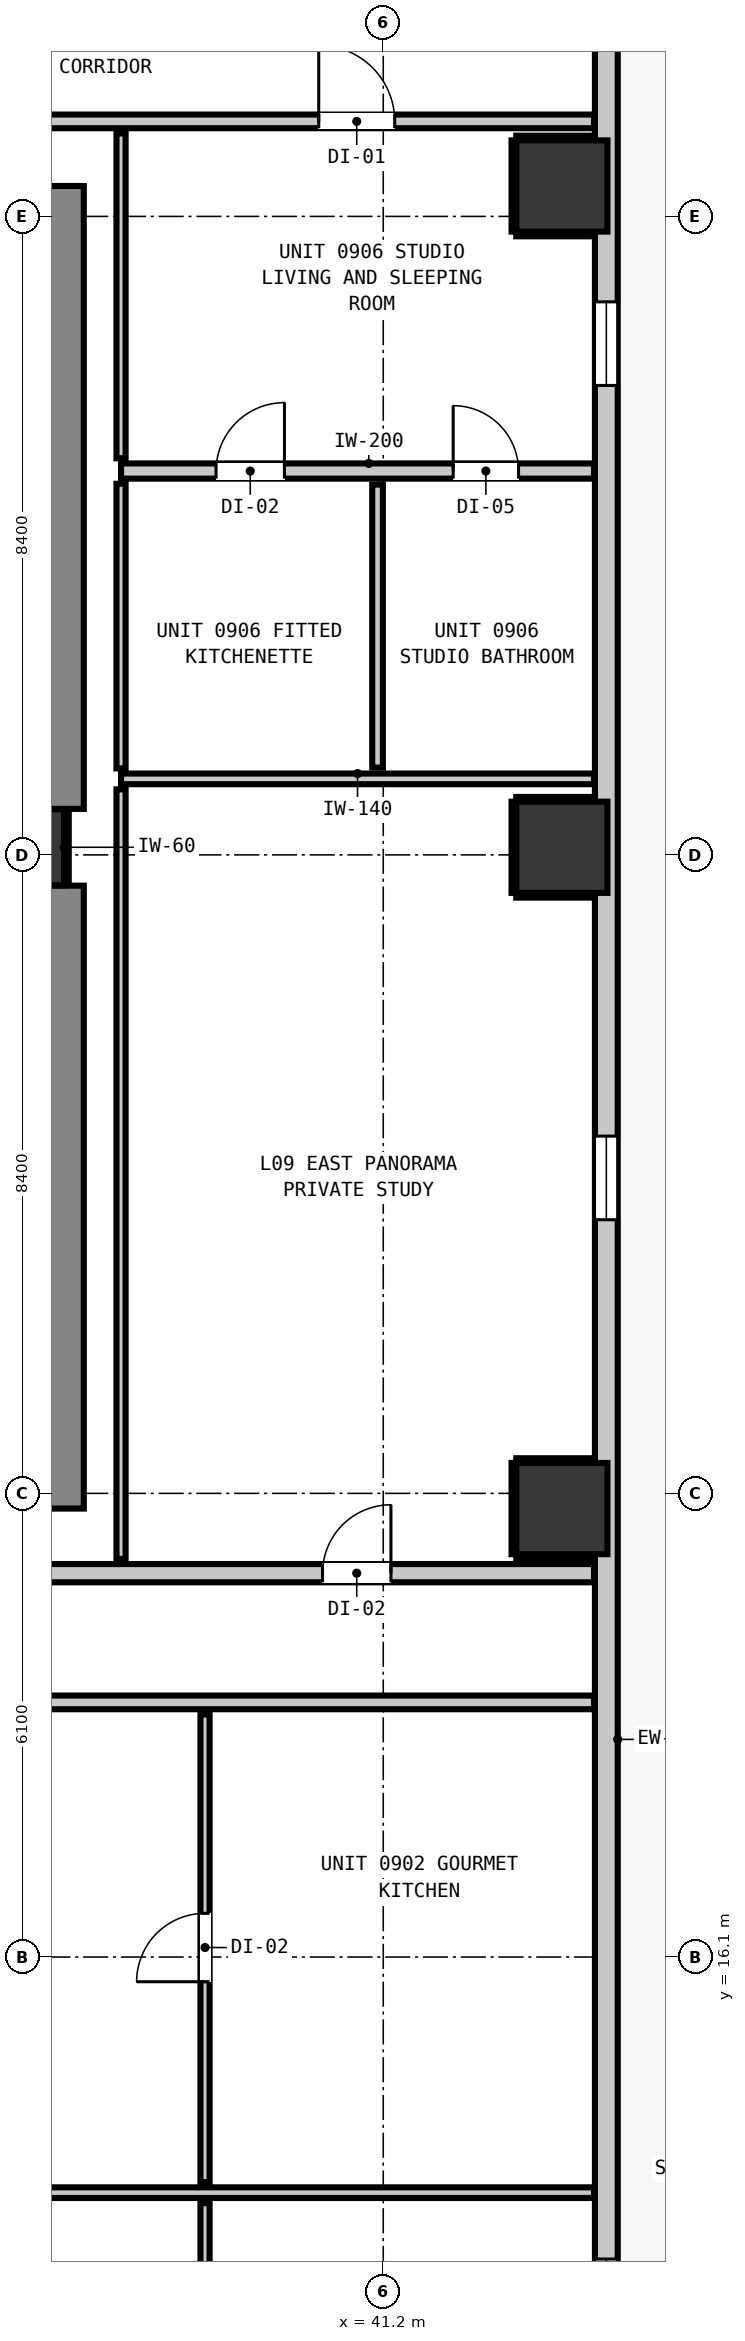
"""IFC4 building model, lengths in metres.
Left out: names, types, materials, properties, quantities, classifications, styles, units other than length and angle.
Written with IfcOpenShell. Run it as: python <this file> out.ifc"""

import sys

from ifc_helpers import new_model, si_unit, direction, frame, frame_2d, origin, origin_2d, place, context, subcontext, project, spatial, rectangle, extrude, element, fill, save


model = new_model("IFC4")
c1 = context("Model", 3, precision=1e-05, world=origin(), true_north=direction((0.0, 1.0)))
c2 = subcontext(c1, "Body", "Model", "MODEL_VIEW")
j1 = project(units=[si_unit("LENGTHUNIT", "METRE"), si_unit("PLANEANGLEUNIT", "RADIAN")], contexts=[c1])
p1 = place(None, origin())
s1 = spatial("IfcSite", under=j1, at=p1, CompositionType="ELEMENT")
p2 = place(p1, origin())
s2 = spatial("IfcBuilding", under=s1, at=p2, CompositionType="ELEMENT")
p3 = place(p2, frame((0.0, 0.0, 35.28)))
s3 = spatial("IfcBuildingStorey", under=s2, at=p3, CompositionType="ELEMENT", Elevation=35.28)
p4 = place(p3, frame((36.5, 30.7, 0.0), z_axis=(0.0, 0.0, 1.0), x_axis=(1.0, 0.0, 0.0)))
e1 = element("IfcColumn", 1, at=p4, inside=s3, PredefinedType="COLUMN", context=c2, shape_type="SweptSolid", body=[
    extrude(rectangle(XDim=1.0, YDim=1.0, at=origin_2d()), origin(), (0.0, 0.0, 1.0), 3.32),
])
p5 = place(p3, frame((36.66, 22.0, 0.0), z_axis=(0.0, 0.0, 1.0), x_axis=(0.0, 1.0, 0.0)))
e2 = element("IfcWall", 2, at=p5, inside=s3, PredefinedType="SHEAR", context=c2, shape_type="SweptSolid", body=[
    extrude(rectangle(XDim=8.195, YDim=1.2, at=frame_2d((4.098, 0.0))), origin(), (0.0, 0.0, 1.0), 3.32),
])
p6 = place(p3, frame((36.66, 31.205, 0.0), z_axis=(0.0, 0.0, 1.0), x_axis=(0.0, 1.0, 0.0)))
e3 = element("IfcWall", 3, at=p6, inside=s3, PredefinedType="SHEAR", context=c2, shape_type="SweptSolid", body=[
    extrude(rectangle(XDim=8.195, YDim=1.2, at=frame_2d((4.097, 0.0))), origin(), (0.0, 0.0, 1.0), 3.32),
])
for number, where, z_axis, x_axis in (
    (4, (43.55, 22.0, 0.0), (0.0, 0.0, 1.0), (1.0, 0.0, 0.0)),
    (5, (43.55, 30.7, 0.0), (0.0, 0.0, 1.0), (1.0, 0.0, 0.0)),
    (6, (43.55, 39.4, 0.0), (0.0, 0.0, 1.0), (1.0, 0.0, 0.0)),
):
    element("IfcColumn", number, at=place(p3, frame(where, z_axis=z_axis, x_axis=x_axis)), inside=s3, PredefinedType="COLUMN", context=c2, shape_type="SweptSolid", body=[
        extrude(rectangle(XDim=1.2, YDim=1.2, at=origin_2d()), origin(), (0.0, 0.0, 1.0), 3.32),
    ])
p7 = place(p3, frame((44.135, 44.835, 0.0), z_axis=(0.0, 0.0, 1.0), x_axis=(0.0, -1.0, 0.0)))
e7 = element("IfcWall", 7, at=p7, inside=s3, PredefinedType="STANDARD", context=c2, shape_type="SweptSolid", body=[
    extrude(rectangle(XDim=34.67, YDim=0.3, at=frame_2d((17.335, 0.0))), origin(), (0.0, 0.0, 1.0), 3.06),
])
p8 = place(p7, frame((1.251, 0.0, 0.0)))
e8 = element("IfcOpeningElement", 8, at=p8, cuts=e7, PredefinedType="OPENING", context=c2, shape_type="SweptSolid", body=[
    extrude(rectangle(XDim=1.0, YDim=2.15, at=frame_2d((0.5, 1.075))), frame((0.0, 0.16, 0.0), z_axis=(0.0, -1.0, 0.0), x_axis=(1.0, 0.0, 0.0)), (0.0, 0.0, 1.0), 0.32),
])
p9 = place(p7, frame((32.708, 0.0, 0.85)))
e9 = element("IfcOpeningElement", 9, at=p9, cuts=e7, PredefinedType="OPENING", context=c2, shape_type="SweptSolid", body=[
    extrude(rectangle(XDim=1.1, YDim=2.05, at=frame_2d((0.55, 1.025))), frame((0.0, 0.16, 0.0), z_axis=(0.0, -1.0, 0.0), x_axis=(1.0, 0.0, 0.0)), (0.0, 0.0, 1.0), 0.32),
])
p10 = place(p7, frame((17.935, 0.0, 0.85)))
e10 = element("IfcOpeningElement", 10, at=p10, cuts=e7, PredefinedType="OPENING", context=c2, shape_type="SweptSolid", body=[
    extrude(rectangle(XDim=1.1, YDim=2.05, at=frame_2d((0.55, 1.025))), frame((0.0, 0.16, 0.0), z_axis=(0.0, -1.0, 0.0), x_axis=(1.0, 0.0, 0.0)), (0.0, 0.0, 1.0), 0.32),
])
p11 = place(p7, frame((6.959, 0.0, 0.85)))
e11 = element("IfcOpeningElement", 11, at=p11, cuts=e7, PredefinedType="OPENING", context=c2, shape_type="SweptSolid", body=[
    extrude(rectangle(XDim=1.1, YDim=2.05, at=frame_2d((0.55, 1.025))), frame((0.0, 0.16, 0.0), z_axis=(0.0, -1.0, 0.0), x_axis=(1.0, 0.0, 0.0)), (0.0, 0.0, 1.0), 0.32),
])
p12 = place(p3, frame((1.827, 21.15, 0.0), z_axis=(0.0, 0.0, 1.0), x_axis=(1.0, 0.0, 0.0)))
e12 = element("IfcWall", 12, at=p12, inside=s3, PredefinedType="PARTITIONING", context=c2, shape_type="SweptSolid", body=[
    extrude(rectangle(XDim=42.146, YDim=0.24, at=frame_2d((21.073, 0.0))), origin(), (0.0, 0.0, 1.0), 3.06),
])
p13 = place(p12, frame((16.383, 0.0, 0.0)))
e13 = element("IfcOpeningElement", 13, at=p13, cuts=e12, PredefinedType="OPENING", context=c2, shape_type="SweptSolid", body=[
    extrude(rectangle(XDim=1.1, YDim=2.15, at=frame_2d((0.55, 1.075))), frame((0.0, 0.13, 0.0), z_axis=(0.0, -1.0, 0.0), x_axis=(1.0, 0.0, 0.0)), (0.0, 0.0, 1.0), 0.26),
])
p14 = place(p12, frame((8.647, 0.0, 0.0)))
e14 = element("IfcOpeningElement", 14, at=p14, cuts=e12, PredefinedType="OPENING", context=c2, shape_type="SweptSolid", body=[
    extrude(rectangle(XDim=1.4, YDim=2.15, at=frame_2d((0.7, 1.075))), frame((0.0, 0.13, 0.0), z_axis=(0.0, -1.0, 0.0), x_axis=(1.0, 0.0, 0.0)), (0.0, 0.0, 1.0), 0.26),
])
p15 = place(p12, frame((38.574, 0.0, 0.0)))
e15 = element("IfcOpeningElement", 15, at=p15, cuts=e12, PredefinedType="OPENING", context=c2, shape_type="SweptSolid", body=[
    extrude(rectangle(XDim=0.9, YDim=2.1, at=frame_2d((0.45, 1.05))), frame((0.0, 0.13, 0.0), z_axis=(0.0, -1.0, 0.0), x_axis=(1.0, 0.0, 0.0)), (0.0, 0.0, 1.0), 0.26),
])
p16 = place(p3, frame((37.75, 35.65, 0.0), z_axis=(0.0, 0.0, 1.0), x_axis=(1.0, 0.0, 0.0)))
e16 = element("IfcWall", 16, at=p16, inside=s3, PredefinedType="PARTITIONING", context=c2, shape_type="SweptSolid", body=[
    extrude(rectangle(XDim=6.223, YDim=0.2, at=frame_2d((3.111, 0.0))), origin(), (0.0, 0.0, 1.0), 3.06),
])
p17 = place(p16, frame((1.25, 0.0, 0.0)))
e17 = element("IfcOpeningElement", 17, at=p17, cuts=e16, PredefinedType="OPENING", context=c2, shape_type="SweptSolid", body=[
    extrude(rectangle(XDim=0.9, YDim=2.1, at=frame_2d((0.45, 1.05))), frame((0.0, 0.11, 0.0), z_axis=(0.0, -1.0, 0.0), x_axis=(1.0, 0.0, 0.0)), (0.0, 0.0, 1.0), 0.22),
])
p18 = place(p16, frame((4.37, 0.0, 0.0)))
e18 = element("IfcOpeningElement", 18, at=p18, cuts=e16, PredefinedType="OPENING", context=c2, shape_type="SweptSolid", body=[
    extrude(rectangle(XDim=0.86, YDim=2.02, at=frame_2d((0.43, 1.01))), frame((0.0, 0.11, 0.0), z_axis=(0.0, -1.0, 0.0), x_axis=(1.0, 0.0, 0.0)), (0.0, 0.0, 1.0), 0.22),
])
p19 = place(p3, frame((1.827, 19.45, 0.0), z_axis=(0.0, 0.0, 1.0), x_axis=(1.0, 0.0, 0.0)))
e19 = element("IfcWall", 19, at=p19, inside=s3, PredefinedType="PARTITIONING", context=c2, shape_type="SweptSolid", body=[
    extrude(rectangle(XDim=42.146, YDim=0.18, at=frame_2d((21.073, 0.0))), origin(), (0.0, 0.0, 1.0), 3.06),
])
p20 = place(p19, frame((8.602, 0.0, 0.0)))
e20 = element("IfcOpeningElement", 20, at=p20, cuts=e19, PredefinedType="OPENING", context=c2, shape_type="SweptSolid", body=[
    extrude(rectangle(XDim=1.0, YDim=2.15, at=frame_2d((0.5, 1.075))), frame((0.0, 0.1, 0.0), z_axis=(0.0, -1.0, 0.0), x_axis=(1.0, 0.0, 0.0)), (0.0, 0.0, 1.0), 0.2),
])
p21 = place(p19, frame((30.475, 0.0, 0.0)))
e21 = element("IfcOpeningElement", 21, at=p21, cuts=e19, PredefinedType="OPENING", context=c2, shape_type="SweptSolid", body=[
    extrude(rectangle(XDim=1.0, YDim=2.15, at=frame_2d((0.5, 1.075))), frame((0.0, 0.1, 0.0), z_axis=(0.0, -1.0, 0.0), x_axis=(1.0, 0.0, 0.0)), (0.0, 0.0, 1.0), 0.2),
])
p22 = place(p3, frame((12.989, 40.25, 0.0), z_axis=(0.0, 0.0, 1.0), x_axis=(1.0, 0.0, 0.0)))
e22 = element("IfcWall", 22, at=p22, inside=s3, PredefinedType="PARTITIONING", context=c2, shape_type="SweptSolid", body=[
    extrude(rectangle(XDim=30.984, YDim=0.18, at=frame_2d((15.492, 0.0))), origin(), (0.0, 0.0, 1.0), 3.06),
])
p23 = place(p22, frame((4.446, 0.0, 0.0)))
e23 = element("IfcOpeningElement", 23, at=p23, cuts=e22, PredefinedType="OPENING", context=c2, shape_type="SweptSolid", body=[
    extrude(rectangle(XDim=1.4, YDim=2.15, at=frame_2d((0.7, 1.075))), frame((0.0, 0.1, 0.0), z_axis=(0.0, -1.0, 0.0), x_axis=(1.0, 0.0, 0.0)), (0.0, 0.0, 1.0), 0.2),
])
p24 = place(p22, frame((27.362, 0.0, 0.0)))
e24 = element("IfcOpeningElement", 24, at=p24, cuts=e22, PredefinedType="OPENING", context=c2, shape_type="SweptSolid", body=[
    extrude(rectangle(XDim=1.0, YDim=2.15, at=frame_2d((0.5, 1.075))), frame((0.0, 0.1, 0.0), z_axis=(0.0, -1.0, 0.0), x_axis=(1.0, 0.0, 0.0)), (0.0, 0.0, 1.0), 0.2),
])
p25 = place(p3, frame((11.688, 13.0, 0.0), z_axis=(0.0, 0.0, 1.0), x_axis=(1.0, 0.0, 0.0)))
e25 = element("IfcWall", 25, at=p25, inside=s3, PredefinedType="PARTITIONING", context=c2, shape_type="SweptSolid", body=[
    extrude(rectangle(XDim=32.285, YDim=0.14, at=frame_2d((16.143, 0.0))), origin(), (0.0, 0.0, 1.0), 3.06),
])
p26 = place(p25, frame((20.664, 0.0, 0.0)))
e26 = element("IfcOpeningElement", 26, at=p26, cuts=e25, PredefinedType="OPENING", context=c2, shape_type="SweptSolid", body=[
    extrude(rectangle(XDim=0.9, YDim=2.1, at=frame_2d((0.45, 1.05))), frame((0.0, 0.08, 0.0), z_axis=(0.0, -1.0, 0.0), x_axis=(1.0, 0.0, 0.0)), (0.0, 0.0, 1.0), 0.16),
])
p27 = place(p3, frame((37.75, 31.6, 0.0), z_axis=(0.0, 0.0, 1.0), x_axis=(1.0, 0.0, 0.0)))
e27 = element("IfcWall", 27, at=p27, inside=s3, PredefinedType="PARTITIONING", context=c2, shape_type="SweptSolid", body=[
    extrude(rectangle(XDim=6.223, YDim=0.14, at=frame_2d((3.111, 0.0))), origin(), (0.0, 0.0, 1.0), 3.06),
])
p28 = place(p3, frame((41.125, 31.748, 0.0), z_axis=(0.0, 0.0, 1.0), x_axis=(0.0, 1.0, 0.0)))
e28 = element("IfcWall", 28, at=p28, inside=s3, PredefinedType="PARTITIONING", context=c2, shape_type="SweptSolid", body=[
    extrude(rectangle(XDim=3.724, YDim=0.14, at=frame_2d((1.862, 0.0))), origin(), (0.0, 0.0, 1.0), 3.06),
])
p29 = place(p3, frame((37.75, 21.338, 0.0), z_axis=(0.0, 0.0, 1.0), x_axis=(0.0, 1.0, 0.0)))
e29 = element("IfcWall", 29, at=p29, inside=s3, PredefinedType="PARTITIONING", context=c2, shape_type="SweptSolid", body=[
    extrude(rectangle(XDim=10.124, YDim=0.12, at=frame_2d((5.062, 0.0))), origin(), (0.0, 0.0, 1.0), 3.06),
])
p30 = place(p3, frame((37.75, 31.738, 0.0), z_axis=(0.0, 0.0, 1.0), x_axis=(0.0, 1.0, 0.0)))
e30 = element("IfcWall", 30, at=p30, inside=s3, PredefinedType="PARTITIONING", context=c2, shape_type="SweptSolid", body=[
    extrude(rectangle(XDim=3.744, YDim=0.12, at=frame_2d((1.872, 0.0))), origin(), (0.0, 0.0, 1.0), 3.06),
])
p31 = place(p3, frame((37.75, 35.818, 0.0), z_axis=(0.0, 0.0, 1.0), x_axis=(0.0, 1.0, 0.0)))
e31 = element("IfcWall", 31, at=p31, inside=s3, PredefinedType="PARTITIONING", context=c2, shape_type="SweptSolid", body=[
    extrude(rectangle(XDim=4.274, YDim=0.12, at=frame_2d((2.137, 0.0))), origin(), (0.0, 0.0, 1.0), 3.06),
])
p32 = place(p3, frame((38.855, 8.691, 0.0), z_axis=(0.0, 0.0, 1.0), x_axis=(0.0, 1.0, 0.0)))
e32 = element("IfcWall", 32, at=p32, inside=s3, PredefinedType="PARTITIONING", context=c2, shape_type="SweptSolid", body=[
    extrude(rectangle(XDim=4.171, YDim=0.12, at=frame_2d((2.085, 0.0))), origin(), (0.0, 0.0, 1.0), 2.445),
])
p33 = place(p32, frame((1.259, 0.0, 0.0)))
e33 = element("IfcOpeningElement", 33, at=p33, cuts=e32, PredefinedType="OPENING", context=c2, shape_type="SweptSolid", body=[
    extrude(rectangle(XDim=0.9, YDim=2.1, at=frame_2d((0.45, 1.05))), frame((0.0, 0.07, 0.0), z_axis=(0.0, -1.0, 0.0), x_axis=(1.0, 0.0, 0.0)), (0.0, 0.0, 1.0), 0.14),
])
p34 = place(p3, frame((38.855, 13.138, 0.0), z_axis=(0.0, 0.0, 1.0), x_axis=(0.0, 1.0, 0.0)))
e34 = element("IfcWall", 34, at=p34, inside=s3, PredefinedType="PARTITIONING", context=c2, shape_type="SweptSolid", body=[
    extrude(rectangle(XDim=6.154, YDim=0.12, at=frame_2d((3.077, 0.0))), origin(), (0.0, 0.0, 1.0), 2.445),
])
p35 = place(p34, frame((2.637, 0.0, 0.0)))
e35 = element("IfcOpeningElement", 35, at=p35, cuts=e34, PredefinedType="OPENING", context=c2, shape_type="SweptSolid", body=[
    extrude(rectangle(XDim=0.9, YDim=2.1, at=frame_2d((0.45, 1.05))), frame((0.0, 0.07, 0.0), z_axis=(0.0, -1.0, 0.0), x_axis=(1.0, 0.0, 0.0)), (0.0, 0.0, 1.0), 0.14),
])
p36 = place(p3, frame((37.032, 30.21, 0.0), z_axis=(0.0, 0.0, 1.0), x_axis=(0.0, 1.0, 0.0)))
e36 = element("IfcWall", 36, at=p36, inside=s3, PredefinedType="PARTITIONING", context=c2, shape_type="SweptSolid", body=[
    extrude(rectangle(XDim=0.98, YDim=0.06, at=frame_2d((0.49, 0.0))), origin(), (0.0, 0.0, 1.0), 1.45),
])
for number, where, z_axis, x_axis in (
    (37, (42.95, 21.368, 0.0), (0.0, 0.0, 1.0), (1.0, 0.0, 0.0)),
    (38, (42.95, 22.632, 0.0), (0.0, 0.0, 1.0), (1.0, 0.0, 0.0)),
):
    element("IfcWall", number, at=place(p3, frame(where, z_axis=z_axis, x_axis=x_axis)), inside=s3, PredefinedType="PARTITIONING", context=c2, shape_type="SweptSolid", body=[
        extrude(rectangle(XDim=1.02, YDim=0.06, at=frame_2d((0.51, 0.0))), origin(), (0.0, 0.0, 1.0), 1.45),
    ])
p37 = place(p3, frame((42.918, 21.4, 0.0), z_axis=(0.0, 0.0, 1.0), x_axis=(0.0, 1.0, 0.0)))
e39 = element("IfcWall", 39, at=p37, inside=s3, PredefinedType="PARTITIONING", context=c2, shape_type="SweptSolid", body=[
    extrude(rectangle(XDim=1.2, YDim=0.06, at=frame_2d((0.6, 0.0))), origin(), (0.0, 0.0, 1.0), 1.45),
])
for number, where, z_axis, x_axis in (
    (40, (42.95, 30.068, 0.0), (0.0, 0.0, 1.0), (1.0, 0.0, 0.0)),
    (41, (42.95, 31.332, 0.0), (0.0, 0.0, 1.0), (1.0, 0.0, 0.0)),
):
    element("IfcWall", number, at=place(p3, frame(where, z_axis=z_axis, x_axis=x_axis)), inside=s3, PredefinedType="PARTITIONING", context=c2, shape_type="SweptSolid", body=[
        extrude(rectangle(XDim=1.02, YDim=0.06, at=frame_2d((0.51, 0.0))), origin(), (0.0, 0.0, 1.0), 1.45),
    ])
p38 = place(p3, frame((42.918, 30.1, 0.0), z_axis=(0.0, 0.0, 1.0), x_axis=(0.0, 1.0, 0.0)))
e42 = element("IfcWall", 42, at=p38, inside=s3, PredefinedType="PARTITIONING", context=c2, shape_type="SweptSolid", body=[
    extrude(rectangle(XDim=1.2, YDim=0.06, at=frame_2d((0.6, 0.0))), origin(), (0.0, 0.0, 1.0), 1.45),
])
for number, where, z_axis, x_axis in (
    (43, (42.95, 38.768, 0.0), (0.0, 0.0, 1.0), (1.0, 0.0, 0.0)),
    (44, (42.95, 40.032, 0.0), (0.0, 0.0, 1.0), (1.0, 0.0, 0.0)),
):
    element("IfcWall", number, at=place(p3, frame(where, z_axis=z_axis, x_axis=x_axis)), inside=s3, PredefinedType="PARTITIONING", context=c2, shape_type="SweptSolid", body=[
        extrude(rectangle(XDim=1.02, YDim=0.06, at=frame_2d((0.51, 0.0))), origin(), (0.0, 0.0, 1.0), 1.45),
    ])
p39 = place(p3, frame((42.918, 38.8, 0.0), z_axis=(0.0, 0.0, 1.0), x_axis=(0.0, 1.0, 0.0)))
e45 = element("IfcWall", 45, at=p39, inside=s3, PredefinedType="PARTITIONING", context=c2, shape_type="SweptSolid", body=[
    extrude(rectangle(XDim=1.2, YDim=0.06, at=frame_2d((0.6, 0.0))), origin(), (0.0, 0.0, 1.0), 1.45),
])
p40 = place(p9, origin())
e46 = element("IfcWindow", 46, at=p40, inside=s3, PartitioningType="SINGLE_PANEL", PredefinedType="WINDOW", context=c2, shape_type="SweptSolid", body=[
    extrude(rectangle(XDim=1.1, YDim=2.05, at=frame_2d((0.55, 1.025))), frame((0.0, 0.03, 0.0), z_axis=(0.0, -1.0, 0.0), x_axis=(1.0, 0.0, 0.0)), (0.0, 0.0, 1.0), 0.06),
])
fill(e9, e46)
p41 = place(p10, origin())
e47 = element("IfcWindow", 47, at=p41, inside=s3, PartitioningType="SINGLE_PANEL", PredefinedType="WINDOW", context=c2, shape_type="SweptSolid", body=[
    extrude(rectangle(XDim=1.1, YDim=2.05, at=frame_2d((0.55, 1.025))), frame((0.0, 0.03, 0.0), z_axis=(0.0, -1.0, 0.0), x_axis=(1.0, 0.0, 0.0)), (0.0, 0.0, 1.0), 0.06),
])
fill(e10, e47)
p42 = place(p11, origin())
e48 = element("IfcWindow", 48, at=p42, inside=s3, PartitioningType="SINGLE_PANEL", PredefinedType="WINDOW", context=c2, shape_type="SweptSolid", body=[
    extrude(rectangle(XDim=1.1, YDim=2.05, at=frame_2d((0.55, 1.025))), frame((0.0, 0.03, 0.0), z_axis=(0.0, -1.0, 0.0), x_axis=(1.0, 0.0, 0.0)), (0.0, 0.0, 1.0), 0.06),
])
fill(e11, e48)
p43 = place(p35, origin())
e49 = element("IfcDoor", 49, at=p43, inside=s3, OperationType="SINGLE_SWING_LEFT", PredefinedType="DOOR", context=c2, shape_type="SweptSolid", body=[
    extrude(rectangle(XDim=0.9, YDim=2.1, at=frame_2d((0.45, 1.05))), frame((0.0, 0.025, 0.0), z_axis=(0.0, -1.0, 0.0), x_axis=(1.0, 0.0, 0.0)), (0.0, 0.0, 1.0), 0.05),
])
fill(e35, e49)
p44 = place(p15, origin())
e50 = element("IfcDoor", 50, at=p44, inside=s3, OperationType="SINGLE_SWING_RIGHT", PredefinedType="DOOR", context=c2, shape_type="SweptSolid", body=[
    extrude(rectangle(XDim=0.9, YDim=2.1, at=frame_2d((0.45, 1.05))), frame((0.0, 0.025, 0.0), z_axis=(0.0, -1.0, 0.0), x_axis=(1.0, 0.0, 0.0)), (0.0, 0.0, 1.0), 0.05),
])
fill(e15, e50)
p45 = place(p24, origin())
e51 = element("IfcDoor", 51, at=p45, inside=s3, OperationType="SINGLE_SWING_LEFT", PredefinedType="DOOR", context=c2, shape_type="SweptSolid", body=[
    extrude(rectangle(XDim=1.0, YDim=2.15, at=frame_2d((0.5, 1.075))), frame((0.0, 0.025, 0.0), z_axis=(0.0, -1.0, 0.0), x_axis=(1.0, 0.0, 0.0)), (0.0, 0.0, 1.0), 0.05),
])
fill(e24, e51)
p46 = place(p17, origin())
e52 = element("IfcDoor", 52, at=p46, inside=s3, OperationType="SINGLE_SWING_RIGHT", PredefinedType="DOOR", context=c2, shape_type="SweptSolid", body=[
    extrude(rectangle(XDim=0.9, YDim=2.1, at=frame_2d((0.45, 1.05))), frame((0.0, 0.025, 0.0), z_axis=(0.0, -1.0, 0.0), x_axis=(1.0, 0.0, 0.0)), (0.0, 0.0, 1.0), 0.05),
])
fill(e17, e52)
p47 = place(p18, origin())
e53 = element("IfcDoor", 53, at=p47, inside=s3, OperationType="SINGLE_SWING_LEFT", PredefinedType="DOOR", context=c2, shape_type="SweptSolid", body=[
    extrude(rectangle(XDim=0.86, YDim=2.02, at=frame_2d((0.43, 1.01))), frame((0.0, 0.025, 0.0), z_axis=(0.0, -1.0, 0.0), x_axis=(1.0, 0.0, 0.0)), (0.0, 0.0, 1.0), 0.05),
])
fill(e18, e53)
save(model, sys.argv[1])
